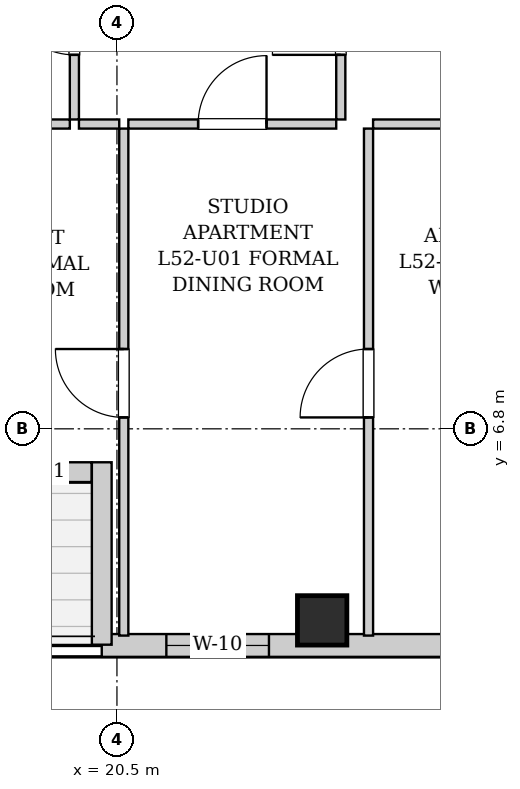
"""IFC4 building model, lengths in metres.
Left out: names, types, materials, properties, quantities, classifications, styles, units other than length and angle.
Written with IfcOpenShell. Run it as: python <this file> out.ifc"""

import sys

from ifc_helpers import new_model, si_unit, direction, frame, frame_2d, origin, origin_2d, place, context, subcontext, project, spatial, rectangle, extrude, element, fill, save


model = new_model("IFC4")
c1 = context("Model", 3, precision=1e-05, world=origin(), true_north=direction((0.0, 1.0)))
c2 = subcontext(c1, "Body", "Model", "MODEL_VIEW")
j1 = project(units=[si_unit("LENGTHUNIT", "METRE"), si_unit("PLANEANGLEUNIT", "RADIAN")], contexts=[c1])
p1 = place(None, origin())
s1 = spatial("IfcSite", under=j1, at=p1, CompositionType="ELEMENT")
p2 = place(p1, origin())
s2 = spatial("IfcBuilding", under=s1, at=p2, CompositionType="ELEMENT")
p3 = place(p2, frame((0.0, 0.0, 181.0)))
s3 = spatial("IfcBuildingStorey", under=s2, at=p3, CompositionType="ELEMENT", Elevation=181.0)
p4 = place(p3, frame((23.2, 4.28, 0.0), z_axis=(0.0, 0.0, 1.0), x_axis=(1.0, 0.0, 0.0)))
e1 = element("IfcColumn", 1, at=p4, inside=s3, PredefinedType="COLUMN", context=c2, shape_type="SweptSolid", body=[
    extrude(rectangle(XDim=0.65, YDim=0.65, at=origin_2d()), origin(), (0.0, 0.0, 1.0), 3.3),
])
p5 = place(p3, frame((31.5, 3.95, 0.0), z_axis=(0.0, 0.0, 1.0), x_axis=(-1.0, 0.0, 0.0)))
e2 = element("IfcWall", 2, at=p5, inside=s3, PredefinedType="SOLIDWALL", context=c2, shape_type="SweptSolid", body=[
    extrude(rectangle(XDim=11.2, YDim=0.3, at=frame_2d((5.6, 0.0))), origin(), (0.0, 0.0, 1.0), 3.04),
])
p6 = place(p5, frame((9.0, 0.0, 0.55)))
e3 = element("IfcOpeningElement", 3, at=p6, cuts=e2, PredefinedType="OPENING", context=c2, shape_type="SweptSolid", body=[
    extrude(rectangle(XDim=1.35, YDim=1.2, at=frame_2d((0.675, 0.6))), frame((0.0, 0.16, 0.0), z_axis=(0.0, -1.0, 0.0), x_axis=(1.0, 0.0, 0.0)), (0.0, 0.0, 1.0), 0.32),
])
p7 = place(p5, frame((2.201, 0.0, 0.55)))
e4 = element("IfcOpeningElement", 4, at=p7, cuts=e2, PredefinedType="OPENING", context=c2, shape_type="SweptSolid", body=[
    extrude(rectangle(XDim=1.35, YDim=1.2, at=frame_2d((0.675, 0.6))), frame((0.0, 0.16, 0.0), z_axis=(0.0, -1.0, 0.0), x_axis=(1.0, 0.0, 0.0)), (0.0, 0.0, 1.0), 0.32),
])
p8 = place(p5, frame((0.35, 0.0, 0.55)))
e5 = element("IfcOpeningElement", 5, at=p8, cuts=e2, PredefinedType="OPENING", context=c2, shape_type="SweptSolid", body=[
    extrude(rectangle(XDim=0.68, YDim=1.2, at=frame_2d((0.34, 0.6))), frame((0.0, 0.16, 0.0), z_axis=(0.0, -1.0, 0.0), x_axis=(1.0, 0.0, 0.0)), (0.0, 0.0, 1.0), 0.32),
])
p9 = place(p3, frame((20.3, 3.96, 0.0), z_axis=(0.0, 0.0, 1.0), x_axis=(0.0, 1.0, 0.0)))
e6 = element("IfcWall", 6, at=p9, inside=s3, PredefinedType="SOLIDWALL", context=c2, shape_type="SweptSolid", body=[
    extrude(rectangle(XDim=2.4, YDim=0.26, at=frame_2d((1.2, 0.0))), origin(), (0.0, 0.0, 1.0), 3.04),
])
p10 = place(p3, frame((20.166, 6.23, 0.0), z_axis=(0.0, 0.0, 1.0), x_axis=(-1.0, 0.0, 0.0)))
e7 = element("IfcWall", 7, at=p10, inside=s3, PredefinedType="SOLIDWALL", context=c2, shape_type="SweptSolid", body=[
    extrude(rectangle(XDim=4.332, YDim=0.26, at=frame_2d((2.166, 0.0))), origin(), (0.0, 0.0, 1.0), 3.04),
])
p11 = place(p10, frame((1.556, 0.0, 0.0)))
e8 = element("IfcOpeningElement", 8, at=p11, cuts=e7, PredefinedType="OPENING", context=c2, shape_type="SweptSolid", body=[
    extrude(rectangle(XDim=1.1, YDim=2.0, at=frame_2d((0.55, 1.0))), frame((0.0, 0.14, 0.0), z_axis=(0.0, -1.0, 0.0), x_axis=(1.0, 0.0, 0.0)), (0.0, 0.0, 1.0), 0.28),
])
p12 = place(p10, frame((0.546, 0.0, 0.55)))
e9 = element("IfcOpeningElement", 9, at=p12, cuts=e7, PredefinedType="OPENING", context=c2, shape_type="SweptSolid", body=[
    extrude(rectangle(XDim=0.85, YDim=1.2, at=frame_2d((0.425, 0.6))), frame((0.0, 0.14, 0.0), z_axis=(0.0, -1.0, 0.0), x_axis=(1.0, 0.0, 0.0)), (0.0, 0.0, 1.0), 0.28),
])
p13 = place(p3, frame((19.94, 10.87, 0.0), z_axis=(0.0, 0.0, 1.0), x_axis=(0.0, 1.0, 0.0)))
e10 = element("IfcWall", 10, at=p13, inside=s3, PredefinedType="PARTITIONING", context=c2, shape_type="SweptSolid", body=[
    extrude(rectangle(XDim=2.6, YDim=0.12, at=frame_2d((1.3, 0.0))), origin(), (0.0, 0.0, 1.0), 3.04),
])
p14 = place(p13, frame((0.85, 0.0, 0.0)))
e11 = element("IfcOpeningElement", 11, at=p14, cuts=e10, PredefinedType="OPENING", context=c2, shape_type="SweptSolid", body=[
    extrude(rectangle(XDim=0.9, YDim=2.05, at=frame_2d((0.45, 1.025))), frame((0.0, 0.07, 0.0), z_axis=(0.0, -1.0, 0.0), x_axis=(1.0, 0.0, 0.0)), (0.0, 0.0, 1.0), 0.14),
])
p15 = place(p3, frame((17.43, 10.81, 0.0), z_axis=(0.0, 0.0, 1.0), x_axis=(1.0, 0.0, 0.0)))
e12 = element("IfcWall", 12, at=p15, inside=s3, PredefinedType="PARTITIONING", context=c2, shape_type="SweptSolid", body=[
    extrude(rectangle(XDim=2.45, YDim=0.12, at=frame_2d((1.225, 0.0))), origin(), (0.0, 0.0, 1.0), 3.04),
])
p16 = place(p15, frame((0.775, 0.0, 0.0)))
e13 = element("IfcOpeningElement", 13, at=p16, cuts=e12, PredefinedType="OPENING", context=c2, shape_type="SweptSolid", body=[
    extrude(rectangle(XDim=0.9, YDim=2.05, at=frame_2d((0.45, 1.025))), frame((0.0, 0.07, 0.0), z_axis=(0.0, -1.0, 0.0), x_axis=(1.0, 0.0, 0.0)), (0.0, 0.0, 1.0), 0.14),
])
p17 = place(p3, frame((23.445, 10.87, 0.0), z_axis=(0.0, 0.0, 1.0), x_axis=(0.0, 1.0, 0.0)))
e14 = element("IfcWall", 14, at=p17, inside=s3, PredefinedType="PARTITIONING", context=c2, shape_type="SweptSolid", body=[
    extrude(rectangle(XDim=2.6, YDim=0.12, at=frame_2d((1.3, 0.0))), origin(), (0.0, 0.0, 1.0), 3.04),
])
p18 = place(p17, frame((0.85, 0.0, 0.0)))
e15 = element("IfcOpeningElement", 15, at=p18, cuts=e14, PredefinedType="OPENING", context=c2, shape_type="SweptSolid", body=[
    extrude(rectangle(XDim=0.9, YDim=2.05, at=frame_2d((0.45, 1.025))), frame((0.0, 0.07, 0.0), z_axis=(0.0, -1.0, 0.0), x_axis=(1.0, 0.0, 0.0)), (0.0, 0.0, 1.0), 0.14),
])
p19 = place(p3, frame((20.0, 10.81, 0.0), z_axis=(0.0, 0.0, 1.0), x_axis=(1.0, 0.0, 0.0)))
e16 = element("IfcWall", 16, at=p19, inside=s3, PredefinedType="PARTITIONING", context=c2, shape_type="SweptSolid", body=[
    extrude(rectangle(XDim=0.53, YDim=0.12, at=frame_2d((0.265, 0.0))), origin(), (0.0, 0.0, 1.0), 3.04),
])
p20 = place(p3, frame((20.65, 10.81, 0.0), z_axis=(0.0, 0.0, 1.0), x_axis=(1.0, 0.0, 0.0)))
e17 = element("IfcWall", 17, at=p20, inside=s3, PredefinedType="PARTITIONING", context=c2, shape_type="SweptSolid", body=[
    extrude(rectangle(XDim=2.735, YDim=0.12, at=frame_2d((1.368, 0.0))), origin(), (0.0, 0.0, 1.0), 3.04),
])
p21 = place(p20, frame((0.918, 0.0, 0.0)))
e18 = element("IfcOpeningElement", 18, at=p21, cuts=e17, PredefinedType="OPENING", context=c2, shape_type="SweptSolid", body=[
    extrude(rectangle(XDim=0.9, YDim=2.05, at=frame_2d((0.45, 1.025))), frame((0.0, 0.07, 0.0), z_axis=(0.0, -1.0, 0.0), x_axis=(1.0, 0.0, 0.0)), (0.0, 0.0, 1.0), 0.14),
])
p22 = place(p3, frame((23.87, 10.81, 0.0), z_axis=(0.0, 0.0, 1.0), x_axis=(1.0, 0.0, 0.0)))
e19 = element("IfcWall", 19, at=p22, inside=s3, PredefinedType="PARTITIONING", context=c2, shape_type="SweptSolid", body=[
    extrude(rectangle(XDim=3.02, YDim=0.12, at=frame_2d((1.51, 0.0))), origin(), (0.0, 0.0, 1.0), 3.04),
])
p23 = place(p22, frame((1.06, 0.0, 0.0)))
e20 = element("IfcOpeningElement", 20, at=p23, cuts=e19, PredefinedType="OPENING", context=c2, shape_type="SweptSolid", body=[
    extrude(rectangle(XDim=0.9, YDim=2.05, at=frame_2d((0.45, 1.025))), frame((0.0, 0.07, 0.0), z_axis=(0.0, -1.0, 0.0), x_axis=(1.0, 0.0, 0.0)), (0.0, 0.0, 1.0), 0.14),
])
p24 = place(p3, frame((20.59, 4.08, 0.0), z_axis=(0.0, 0.0, 1.0), x_axis=(0.0, 1.0, 0.0)))
e21 = element("IfcWall", 21, at=p24, inside=s3, PredefinedType="PARTITIONING", context=c2, shape_type="SweptSolid", body=[
    extrude(rectangle(XDim=6.67, YDim=0.12, at=frame_2d((3.335, 0.0))), origin(), (0.0, 0.0, 1.0), 3.04),
])
p25 = place(p24, frame((2.87, 0.0, 0.0)))
e22 = element("IfcOpeningElement", 22, at=p25, cuts=e21, PredefinedType="OPENING", context=c2, shape_type="SweptSolid", body=[
    extrude(rectangle(XDim=0.9, YDim=2.05, at=frame_2d((0.45, 1.025))), frame((0.0, 0.07, 0.0), z_axis=(0.0, -1.0, 0.0), x_axis=(1.0, 0.0, 0.0)), (0.0, 0.0, 1.0), 0.14),
])
p26 = place(p3, frame((23.81, 4.08, 0.0), z_axis=(0.0, 0.0, 1.0), x_axis=(0.0, 1.0, 0.0)))
e23 = element("IfcWall", 23, at=p26, inside=s3, PredefinedType="PARTITIONING", context=c2, shape_type="SweptSolid", body=[
    extrude(rectangle(XDim=6.67, YDim=0.12, at=frame_2d((3.335, 0.0))), origin(), (0.0, 0.0, 1.0), 3.04),
])
p27 = place(p26, frame((2.87, 0.0, 0.0)))
e24 = element("IfcOpeningElement", 24, at=p27, cuts=e23, PredefinedType="OPENING", context=c2, shape_type="SweptSolid", body=[
    extrude(rectangle(XDim=0.9, YDim=2.05, at=frame_2d((0.45, 1.025))), frame((0.0, 0.07, 0.0), z_axis=(0.0, -1.0, 0.0), x_axis=(1.0, 0.0, 0.0)), (0.0, 0.0, 1.0), 0.14),
])
p28 = place(p14, origin())
e25 = element("IfcDoor", 25, at=p28, inside=s3, OperationType="SINGLE_SWING_RIGHT", PredefinedType="DOOR", context=c2, shape_type="SweptSolid", body=[
    extrude(rectangle(XDim=0.9, YDim=2.05, at=frame_2d((0.45, 1.025))), frame((0.0, 0.025, 0.0), z_axis=(0.0, -1.0, 0.0), x_axis=(1.0, 0.0, 0.0)), (0.0, 0.0, 1.0), 0.05),
])
fill(e11, e25)
p29 = place(p18, origin())
e26 = element("IfcDoor", 26, at=p29, inside=s3, OperationType="SINGLE_SWING_LEFT", PredefinedType="DOOR", context=c2, shape_type="SweptSolid", body=[
    extrude(rectangle(XDim=0.9, YDim=2.05, at=frame_2d((0.45, 1.025))), frame((0.0, 0.025, 0.0), z_axis=(0.0, -1.0, 0.0), x_axis=(1.0, 0.0, 0.0)), (0.0, 0.0, 1.0), 0.05),
])
fill(e15, e26)
p30 = place(p21, origin())
e27 = element("IfcDoor", 27, at=p30, inside=s3, OperationType="SINGLE_SWING_RIGHT", PredefinedType="DOOR", context=c2, shape_type="SweptSolid", body=[
    extrude(rectangle(XDim=0.9, YDim=2.05, at=frame_2d((0.45, 1.025))), frame((0.0, 0.025, 0.0), z_axis=(0.0, -1.0, 0.0), x_axis=(1.0, 0.0, 0.0)), (0.0, 0.0, 1.0), 0.05),
])
fill(e18, e27)
p31 = place(p25, origin())
e28 = element("IfcDoor", 28, at=p31, inside=s3, OperationType="SINGLE_SWING_RIGHT", PredefinedType="DOOR", context=c2, shape_type="SweptSolid", body=[
    extrude(rectangle(XDim=0.9, YDim=2.05, at=frame_2d((0.45, 1.025))), frame((0.0, 0.025, 0.0), z_axis=(0.0, -1.0, 0.0), x_axis=(1.0, 0.0, 0.0)), (0.0, 0.0, 1.0), 0.05),
])
fill(e22, e28)
p32 = place(p27, origin())
e29 = element("IfcDoor", 29, at=p32, inside=s3, OperationType="SINGLE_SWING_LEFT", PredefinedType="DOOR", context=c2, shape_type="SweptSolid", body=[
    extrude(rectangle(XDim=0.9, YDim=2.05, at=frame_2d((0.45, 1.025))), frame((0.0, 0.025, 0.0), z_axis=(0.0, -1.0, 0.0), x_axis=(1.0, 0.0, 0.0)), (0.0, 0.0, 1.0), 0.05),
])
fill(e24, e29)
p33 = place(p6, origin())
e30 = element("IfcWindow", 30, at=p33, inside=s3, PartitioningType="SINGLE_PANEL", PredefinedType="WINDOW", context=c2, shape_type="SweptSolid", body=[
    extrude(rectangle(XDim=1.35, YDim=1.2, at=frame_2d((0.675, 0.6))), frame((0.0, 0.03, 0.0), z_axis=(0.0, -1.0, 0.0), x_axis=(1.0, 0.0, 0.0)), (0.0, 0.0, 1.0), 0.06),
])
fill(e3, e30)
save(model, sys.argv[1])
